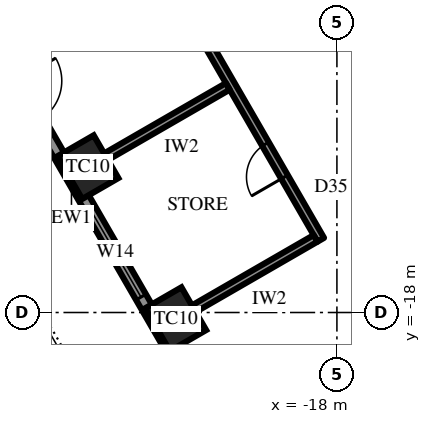
"""IFC4 building model, lengths in metres.
Left out: names, types, materials, properties, quantities, classifications, styles, units other than length and angle.
Written with IfcOpenShell. Run it as: python <this file> out.ifc"""

import sys

from ifc_helpers import new_model, si_unit, direction, frame, frame_2d, origin, origin_2d, place, context, subcontext, project, spatial, rectangle, extrude, element, fill, save


model = new_model("IFC4")
c1 = context("Model", 3, precision=1e-05, world=origin(), true_north=direction((0.0, 1.0)))
c2 = subcontext(c1, "Body", "Model", "MODEL_VIEW")
j1 = project(units=[si_unit("LENGTHUNIT", "METRE"), si_unit("PLANEANGLEUNIT", "RADIAN")], contexts=[c1])
p1 = place(None, origin())
s1 = spatial("IfcSite", under=j1, at=p1, CompositionType="ELEMENT")
p2 = place(p1, origin())
s2 = spatial("IfcBuilding", under=s1, at=p2, CompositionType="ELEMENT")
p3 = place(p2, frame((0.0, 0.0, 249.1)))
s3 = spatial("IfcBuildingStorey", under=s2, at=p3, CompositionType="ELEMENT", Elevation=249.1)
for number, where, z_axis, x_axis in (
    (1, (-24.552, -14.175, 0.0), (0.0, 0.0, 1.0), (0.5, -0.866, 0.0)),
    (2, (-22.242, -18.175, 0.0), (0.0, 0.0, 1.0), (0.5, -0.866, 0.0)),
):
    element("IfcColumn", number, at=place(p3, frame(where, z_axis=z_axis, x_axis=x_axis)), inside=s3, PredefinedType="COLUMN", context=c2, shape_type="SweptSolid", body=[
        extrude(rectangle(XDim=1.3, YDim=1.1, at=origin_2d()), origin(), (0.0, 0.0, 1.0), 4.2),
    ])
p4 = place(p3, frame((-31.263, -3.551, 0.0), z_axis=(0.0, 0.0, 1.0), x_axis=(0.500000442367, -0.866025148383, 0.0)))
e3 = element("IfcWall", 3, at=p4, inside=s3, PredefinedType="SOLIDWALL", context=c2, shape_type="SweptSolid", body=[
    extrude(rectangle(XDim=25.113, YDim=0.3, at=frame_2d((12.556, 0.0))), origin(), (0.0, 0.0, 1.0), 2.8),
])
p5 = place(p4, frame((4.278, 0.0, 0.6)))
e4 = element("IfcOpeningElement", 4, at=p5, cuts=e3, PredefinedType="OPENING", context=c2, shape_type="SweptSolid", body=[
    extrude(rectangle(XDim=2.7, YDim=1.95, at=frame_2d((1.35, 0.975))), frame((0.0, 0.16, 0.0), z_axis=(0.0, -1.0, 0.0), x_axis=(1.0, 0.0, 0.0)), (0.0, 0.0, 1.0), 0.32),
])
p6 = place(p4, frame((9.647, 0.0, 0.0)))
e5 = element("IfcOpeningElement", 5, at=p6, cuts=e3, PredefinedType="OPENING", context=c2, shape_type="SweptSolid", body=[
    extrude(rectangle(XDim=1.2, YDim=2.4, at=frame_2d((0.6, 1.2))), frame((0.0, 0.16, 0.0), z_axis=(0.0, -1.0, 0.0), x_axis=(1.0, 0.0, 0.0)), (0.0, 0.0, 1.0), 0.32),
])
p7 = place(p4, frame((13.516, 0.0, 0.6)))
e6 = element("IfcOpeningElement", 6, at=p7, cuts=e3, PredefinedType="OPENING", context=c2, shape_type="SweptSolid", body=[
    extrude(rectangle(XDim=2.7, YDim=1.95, at=frame_2d((1.35, 0.975))), frame((0.0, 0.16, 0.0), z_axis=(0.0, -1.0, 0.0), x_axis=(1.0, 0.0, 0.0)), (0.0, 0.0, 1.0), 0.32),
])
p8 = place(p4, frame((18.135, 0.0, 0.6)))
e7 = element("IfcOpeningElement", 7, at=p8, cuts=e3, PredefinedType="OPENING", context=c2, shape_type="SweptSolid", body=[
    extrude(rectangle(XDim=2.7, YDim=1.95, at=frame_2d((1.35, 0.975))), frame((0.0, 0.16, 0.0), z_axis=(0.0, -1.0, 0.0), x_axis=(1.0, 0.0, 0.0)), (0.0, 0.0, 1.0), 0.32),
])
p9 = place(p3, frame((-25.453, -3.913, 0.0), z_axis=(0.0, 0.0, 1.0), x_axis=(0.499989069193, -0.866031714597, 0.0)))
e8 = element("IfcWall", 8, at=p9, inside=s3, PredefinedType="PARTITIONING", context=c2, shape_type="SweptSolid", body=[
    extrude(rectangle(XDim=14.056, YDim=0.2, at=frame_2d((7.028, 0.0))), origin(), (0.0, 0.0, 1.0), 4.0),
])
p10 = place(p9, frame((3.819, 0.0, 0.0)))
e9 = element("IfcOpeningElement", 9, at=p10, cuts=e8, PredefinedType="OPENING", context=c2, shape_type="SweptSolid", body=[
    extrude(rectangle(XDim=1.8, YDim=2.4, at=frame_2d((0.9, 1.2))), frame((0.0, 0.11, 0.0), z_axis=(0.0, -1.0, 0.0), x_axis=(1.0, 0.0, 0.0)), (0.0, 0.0, 1.0), 0.22),
])
p11 = place(p9, frame((11.147, 0.0, 0.0)))
e10 = element("IfcOpeningElement", 10, at=p11, cuts=e8, PredefinedType="OPENING", context=c2, shape_type="SweptSolid", body=[
    extrude(rectangle(XDim=1.0, YDim=2.2, at=frame_2d((0.5, 1.1))), frame((0.0, 0.11, 0.0), z_axis=(0.0, -1.0, 0.0), x_axis=(1.0, 0.0, 0.0)), (0.0, 0.0, 1.0), 0.22),
])
for number, where, z_axis, x_axis in (
    (11, (-20.871, -12.05, 0.0), (0.0, 0.0, 1.0), (-0.866, -0.5, 0.0)),
    (12, (-18.562, -16.05, 0.0), (0.0, 0.0, 1.0), (-0.866, -0.5, 0.0)),
):
    element("IfcWall", number, at=place(p3, frame(where, z_axis=z_axis, x_axis=x_axis)), inside=s3, PredefinedType="PARTITIONING", context=c2, shape_type="SweptSolid", body=[
        extrude(rectangle(XDim=3.7, YDim=0.2, at=frame_2d((1.85, 0.0))), origin(), (0.0, 0.0, 1.0), 3.082),
    ])
p12 = place(p7, origin())
e13 = element("IfcWindow", 13, at=p12, inside=s3, PartitioningType="SINGLE_PANEL", PredefinedType="WINDOW", context=c2, shape_type="SweptSolid", body=[
    extrude(rectangle(XDim=2.7, YDim=1.95, at=frame_2d((1.35, 0.975))), frame((0.0, 0.03, 0.0), z_axis=(0.0, -1.0, 0.0), x_axis=(1.0, 0.0, 0.0)), (0.0, 0.0, 1.0), 0.06),
])
fill(e6, e13)
p13 = place(p11, frame((1.0, 0.0, 0.0), z_axis=(0.0, 0.0, 1.0), x_axis=(-1.0, 0.0, 0.0)))
e14 = element("IfcDoor", 14, at=p13, inside=s3, OperationType="SINGLE_SWING_RIGHT", PredefinedType="DOOR", context=c2, shape_type="SweptSolid", body=[
    extrude(rectangle(XDim=1.0, YDim=2.2, at=frame_2d((0.5, 1.1))), frame((0.0, 0.025, 0.0), z_axis=(0.0, -1.0, 0.0), x_axis=(1.0, 0.0, 0.0)), (0.0, 0.0, 1.0), 0.05),
])
fill(e10, e14)
save(model, sys.argv[1])
